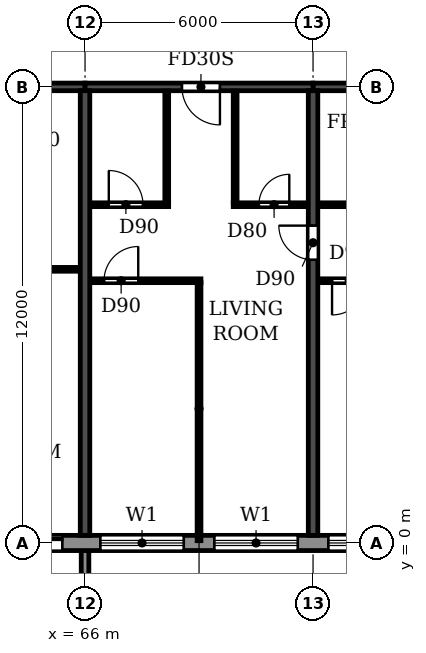
"""IFC4 building model, lengths in metres.
Left out: names, types, materials, properties, quantities, classifications, styles, units other than length and angle.
Written with IfcOpenShell. Run it as: python <this file> out.ifc"""

import sys

from ifc_helpers import new_model, si_unit, direction, frame, frame_2d, origin, place, context, subcontext, project, spatial, polyline, rectangle, outline, extrude, source, transform, mapped, element, fill, save


model = new_model("IFC4")
c1 = context("Model", 3, precision=1e-05, world=origin(), true_north=direction((0.0, 1.0)))
c2 = subcontext(c1, "Body", "Model", "MODEL_VIEW")
j1 = project(units=[si_unit("LENGTHUNIT", "METRE"), si_unit("PLANEANGLEUNIT", "RADIAN")], contexts=[c1])
p1 = place(None, origin())
s1 = spatial("IfcSite", under=j1, at=p1, CompositionType="ELEMENT")
p2 = place(p1, origin())
s2 = spatial("IfcBuilding", under=s1, at=p2, CompositionType="ELEMENT")
p3 = place(p2, frame((0.0, 0.0, 231.3)))
s3 = spatial("IfcBuildingStorey", under=s2, at=p3, CompositionType="ELEMENT", Elevation=231.3)
p4 = place(p3, frame((66.0, 0.2, 0.0), z_axis=(0.0, 0.0, 1.0), x_axis=(0.0, 1.0, 0.0)))
e1 = element("IfcWall", 1, at=p4, inside=s3, PredefinedType="SHEAR", context=c2, shape_type="SweptSolid", body=[
    extrude(rectangle(XDim=11.7, YDim=0.25, at=frame_2d((5.85, 0.0))), origin(), (0.0, 0.0, 1.0), 3.08),
])
p5 = place(p3, frame((72.0, 0.2, 0.0), z_axis=(0.0, 0.0, 1.0), x_axis=(0.0, 1.0, 0.0)))
e2 = element("IfcWall", 2, at=p5, inside=s3, PredefinedType="SHEAR", context=c2, shape_type="SweptSolid", body=[
    extrude(rectangle(XDim=11.7, YDim=0.25, at=frame_2d((5.85, 0.0))), origin(), (0.0, 0.0, 1.0), 3.08),
])
p6 = place(p5, frame((7.25, 0.0, 0.0)))
e3 = element("IfcOpeningElement", 3, at=p6, cuts=e2, PredefinedType="OPENING", context=c2, shape_type="SweptSolid", body=[
    extrude(rectangle(XDim=0.9, YDim=2.1, at=frame_2d((0.45, 1.05))), frame((0.0, 0.135, 0.0), z_axis=(0.0, -1.0, 0.0), x_axis=(1.0, 0.0, 0.0)), (0.0, 0.0, 1.0), 0.27),
])
p7 = place(p3, frame((60.0, 12.0, 0.0), z_axis=(0.0, 0.0, 1.0), x_axis=(1.0, 0.0, 0.0)))
e4 = element("IfcWall", 4, at=p7, inside=s3, PredefinedType="SHEAR", context=c2, shape_type="SweptSolid", body=[
    extrude(rectangle(XDim=6.0, YDim=0.2, at=frame_2d((3.0, 0.0))), origin(), (0.0, 0.0, 1.0), 2.48),
])
p8 = place(p7, frame((2.45, 0.0, 0.0)))
e5 = element("IfcOpeningElement", 5, at=p8, cuts=e4, PredefinedType="OPENING", context=c2, shape_type="SweptSolid", body=[
    extrude(rectangle(XDim=1.0, YDim=2.1, at=frame_2d((0.5, 1.05))), frame((0.0, 0.11, 0.0), z_axis=(0.0, -1.0, 0.0), x_axis=(1.0, 0.0, 0.0)), (0.0, 0.0, 1.0), 0.22),
])
p9 = place(p3, frame((66.0, 12.0, 0.0), z_axis=(0.0, 0.0, 1.0), x_axis=(1.0, 0.0, 0.0)))
e6 = element("IfcWall", 6, at=p9, inside=s3, PredefinedType="SHEAR", context=c2, shape_type="SweptSolid", body=[
    extrude(rectangle(XDim=6.0, YDim=0.2, at=frame_2d((3.0, 0.0))), origin(), (0.0, 0.0, 1.0), 2.48),
])
p10 = place(p9, frame((2.55, 0.0, 0.0)))
e7 = element("IfcOpeningElement", 7, at=p10, cuts=e6, PredefinedType="OPENING", context=c2, shape_type="SweptSolid", body=[
    extrude(rectangle(XDim=1.0, YDim=2.1, at=frame_2d((0.5, 1.05))), frame((0.0, 0.11, 0.0), z_axis=(0.0, -1.0, 0.0), x_axis=(1.0, 0.0, 0.0)), (0.0, 0.0, 1.0), 0.22),
])
p11 = place(p3, frame((72.0, 12.0, 0.0), z_axis=(0.0, 0.0, 1.0), x_axis=(1.0, 0.0, 0.0)))
e8 = element("IfcWall", 8, at=p11, inside=s3, PredefinedType="SHEAR", context=c2, shape_type="SweptSolid", body=[
    extrude(rectangle(XDim=6.0, YDim=0.2, at=frame_2d((3.0, 0.0))), origin(), (0.0, 0.0, 1.0), 2.48),
])
p12 = place(p3, frame((22.683, 0.0, 0.0), z_axis=(0.0, 0.0, 1.0), x_axis=(1.0, 0.0, 0.0)))
e9 = element("IfcWall", 9, at=p12, inside=s3, PredefinedType="STANDARD", context=c2, shape_type="SweptSolid", body=[
    extrude(rectangle(XDim=56.634, YDim=0.4, at=frame_2d((28.317, 0.0))), origin(), (0.0, 0.0, 1.0), 3.08),
])
p13 = place(p12, frame((1.917, 0.0, 0.0)))
e10 = element("IfcOpeningElement", 10, at=p13, cuts=e9, PredefinedType="OPENING", context=c2, shape_type="SweptSolid", body=[
    extrude(rectangle(XDim=1.8, YDim=2.4, at=frame_2d((0.9, 1.2))), frame((0.0, 0.21, 0.0), z_axis=(0.0, -1.0, 0.0), x_axis=(1.0, 0.0, 0.0)), (0.0, 0.0, 1.0), 0.42),
])
p14 = place(p12, frame((4.717, 0.0, 0.9)))
e11 = element("IfcOpeningElement", 11, at=p14, cuts=e9, PredefinedType="OPENING", context=c2, shape_type="SweptSolid", body=[
    extrude(rectangle(XDim=2.2, YDim=1.5, at=frame_2d((1.1, 0.75))), frame((0.0, 0.21, 0.0), z_axis=(0.0, -1.0, 0.0), x_axis=(1.0, 0.0, 0.0)), (0.0, 0.0, 1.0), 0.42),
])
p15 = place(p12, frame((7.717, 0.0, 0.9)))
e12 = element("IfcOpeningElement", 12, at=p15, cuts=e9, PredefinedType="OPENING", context=c2, shape_type="SweptSolid", body=[
    extrude(rectangle(XDim=2.2, YDim=1.5, at=frame_2d((1.1, 0.75))), frame((0.0, 0.21, 0.0), z_axis=(0.0, -1.0, 0.0), x_axis=(1.0, 0.0, 0.0)), (0.0, 0.0, 1.0), 0.42),
])
p16 = place(p12, frame((10.717, 0.0, 0.9)))
e13 = element("IfcOpeningElement", 13, at=p16, cuts=e9, PredefinedType="OPENING", context=c2, shape_type="SweptSolid", body=[
    extrude(rectangle(XDim=2.2, YDim=1.5, at=frame_2d((1.1, 0.75))), frame((0.0, 0.21, 0.0), z_axis=(0.0, -1.0, 0.0), x_axis=(1.0, 0.0, 0.0)), (0.0, 0.0, 1.0), 0.42),
])
p17 = place(p12, frame((13.717, 0.0, 0.9)))
e14 = element("IfcOpeningElement", 14, at=p17, cuts=e9, PredefinedType="OPENING", context=c2, shape_type="SweptSolid", body=[
    extrude(rectangle(XDim=2.2, YDim=1.5, at=frame_2d((1.1, 0.75))), frame((0.0, 0.21, 0.0), z_axis=(0.0, -1.0, 0.0), x_axis=(1.0, 0.0, 0.0)), (0.0, 0.0, 1.0), 0.42),
])
p18 = place(p12, frame((16.917, 0.0, 0.0)))
e15 = element("IfcOpeningElement", 15, at=p18, cuts=e9, PredefinedType="OPENING", context=c2, shape_type="SweptSolid", body=[
    extrude(rectangle(XDim=1.8, YDim=2.4, at=frame_2d((0.9, 1.2))), frame((0.0, 0.21, 0.0), z_axis=(0.0, -1.0, 0.0), x_axis=(1.0, 0.0, 0.0)), (0.0, 0.0, 1.0), 0.42),
])
p19 = place(p12, frame((19.717, 0.0, 0.9)))
e16 = element("IfcOpeningElement", 16, at=p19, cuts=e9, PredefinedType="OPENING", context=c2, shape_type="SweptSolid", body=[
    extrude(rectangle(XDim=2.2, YDim=1.5, at=frame_2d((1.1, 0.75))), frame((0.0, 0.21, 0.0), z_axis=(0.0, -1.0, 0.0), x_axis=(1.0, 0.0, 0.0)), (0.0, 0.0, 1.0), 0.42),
])
p20 = place(p12, frame((22.717, 0.0, 0.9)))
e17 = element("IfcOpeningElement", 17, at=p20, cuts=e9, PredefinedType="OPENING", context=c2, shape_type="SweptSolid", body=[
    extrude(rectangle(XDim=2.2, YDim=1.5, at=frame_2d((1.1, 0.75))), frame((0.0, 0.21, 0.0), z_axis=(0.0, -1.0, 0.0), x_axis=(1.0, 0.0, 0.0)), (0.0, 0.0, 1.0), 0.42),
])
p21 = place(p12, frame((25.917, 0.0, 0.0)))
e18 = element("IfcOpeningElement", 18, at=p21, cuts=e9, PredefinedType="OPENING", context=c2, shape_type="SweptSolid", body=[
    extrude(rectangle(XDim=1.8, YDim=2.4, at=frame_2d((0.9, 1.2))), frame((0.0, 0.21, 0.0), z_axis=(0.0, -1.0, 0.0), x_axis=(1.0, 0.0, 0.0)), (0.0, 0.0, 1.0), 0.42),
])
p22 = place(p12, frame((28.717, 0.0, 0.9)))
e19 = element("IfcOpeningElement", 19, at=p22, cuts=e9, PredefinedType="OPENING", context=c2, shape_type="SweptSolid", body=[
    extrude(rectangle(XDim=2.2, YDim=1.5, at=frame_2d((1.1, 0.75))), frame((0.0, 0.21, 0.0), z_axis=(0.0, -1.0, 0.0), x_axis=(1.0, 0.0, 0.0)), (0.0, 0.0, 1.0), 0.42),
])
p23 = place(p12, frame((31.717, 0.0, 0.9)))
e20 = element("IfcOpeningElement", 20, at=p23, cuts=e9, PredefinedType="OPENING", context=c2, shape_type="SweptSolid", body=[
    extrude(rectangle(XDim=2.2, YDim=1.5, at=frame_2d((1.1, 0.75))), frame((0.0, 0.21, 0.0), z_axis=(0.0, -1.0, 0.0), x_axis=(1.0, 0.0, 0.0)), (0.0, 0.0, 1.0), 0.42),
])
p24 = place(p12, frame((34.717, 0.0, 0.9)))
e21 = element("IfcOpeningElement", 21, at=p24, cuts=e9, PredefinedType="OPENING", context=c2, shape_type="SweptSolid", body=[
    extrude(rectangle(XDim=2.2, YDim=1.5, at=frame_2d((1.1, 0.75))), frame((0.0, 0.21, 0.0), z_axis=(0.0, -1.0, 0.0), x_axis=(1.0, 0.0, 0.0)), (0.0, 0.0, 1.0), 0.42),
])
p25 = place(p12, frame((37.717, 0.0, 0.9)))
e22 = element("IfcOpeningElement", 22, at=p25, cuts=e9, PredefinedType="OPENING", context=c2, shape_type="SweptSolid", body=[
    extrude(rectangle(XDim=2.2, YDim=1.5, at=frame_2d((1.1, 0.75))), frame((0.0, 0.21, 0.0), z_axis=(0.0, -1.0, 0.0), x_axis=(1.0, 0.0, 0.0)), (0.0, 0.0, 1.0), 0.42),
])
p26 = place(p12, frame((40.917, 0.0, 0.0)))
e23 = element("IfcOpeningElement", 23, at=p26, cuts=e9, PredefinedType="OPENING", context=c2, shape_type="SweptSolid", body=[
    extrude(rectangle(XDim=1.8, YDim=2.4, at=frame_2d((0.9, 1.2))), frame((0.0, 0.21, 0.0), z_axis=(0.0, -1.0, 0.0), x_axis=(1.0, 0.0, 0.0)), (0.0, 0.0, 1.0), 0.42),
])
p27 = place(p12, frame((43.717, 0.0, 0.9)))
e24 = element("IfcOpeningElement", 24, at=p27, cuts=e9, PredefinedType="OPENING", context=c2, shape_type="SweptSolid", body=[
    extrude(rectangle(XDim=2.2, YDim=1.5, at=frame_2d((1.1, 0.75))), frame((0.0, 0.21, 0.0), z_axis=(0.0, -1.0, 0.0), x_axis=(1.0, 0.0, 0.0)), (0.0, 0.0, 1.0), 0.42),
])
p28 = place(p12, frame((46.717, 0.0, 0.9)))
e25 = element("IfcOpeningElement", 25, at=p28, cuts=e9, PredefinedType="OPENING", context=c2, shape_type="SweptSolid", body=[
    extrude(rectangle(XDim=2.2, YDim=1.5, at=frame_2d((1.1, 0.75))), frame((0.0, 0.21, 0.0), z_axis=(0.0, -1.0, 0.0), x_axis=(1.0, 0.0, 0.0)), (0.0, 0.0, 1.0), 0.42),
])
p29 = place(p12, frame((49.717, 0.0, 0.9)))
e26 = element("IfcOpeningElement", 26, at=p29, cuts=e9, PredefinedType="OPENING", context=c2, shape_type="SweptSolid", body=[
    extrude(rectangle(XDim=2.2, YDim=1.5, at=frame_2d((1.1, 0.75))), frame((0.0, 0.21, 0.0), z_axis=(0.0, -1.0, 0.0), x_axis=(1.0, 0.0, 0.0)), (0.0, 0.0, 1.0), 0.42),
])
p30 = place(p12, frame((52.717, 0.0, 0.9)))
e27 = element("IfcOpeningElement", 27, at=p30, cuts=e9, PredefinedType="OPENING", context=c2, shape_type="SweptSolid", body=[
    extrude(rectangle(XDim=2.2, YDim=1.5, at=frame_2d((1.1, 0.75))), frame((0.0, 0.21, 0.0), z_axis=(0.0, -1.0, 0.0), x_axis=(1.0, 0.0, 0.0)), (0.0, 0.0, 1.0), 0.42),
])
m1 = source(origin(), c2, "Body", "SweptSolid", [
    extrude(outline(polyline([(0.0, 0.0), (0.2, 0.0), (0.2, 1.65), (0.0, 1.65), (0.0, 0.0)])), origin(), (0.0, 0.0, 1.0), 3.1),
])
p31 = place(p3, frame((65.9, -1.85, 0.0)))
e28 = element("IfcWall", 28, at=p31, inside=s3, PredefinedType="STANDARD", context=c2, shape_type="MappedRepresentation", body=[
    mapped(m1, transform((0.0, 0.0, 0.0))),
])
p32 = place(p3, frame((66.135, 6.9, 0.0), z_axis=(0.0, 0.0, 1.0), x_axis=(1.0, 0.0, 0.0)))
e29 = element("IfcWall", 29, at=p32, inside=s3, PredefinedType="PARTITIONING", context=c2, shape_type="SweptSolid", body=[
    extrude(rectangle(XDim=2.915, YDim=0.1, at=frame_2d((1.458, 0.0))), origin(), (0.0, 0.0, 1.0), 3.08),
])
p33 = place(p32, frame((0.365, 0.0, 0.0)))
e30 = element("IfcOpeningElement", 30, at=p33, cuts=e29, PredefinedType="OPENING", context=c2, shape_type="SweptSolid", body=[
    extrude(rectangle(XDim=0.9, YDim=2.1, at=frame_2d((0.45, 1.05))), frame((0.0, 0.06, 0.0), z_axis=(0.0, -1.0, 0.0), x_axis=(1.0, 0.0, 0.0)), (0.0, 0.0, 1.0), 0.12),
])
p34 = place(p3, frame((72.135, 6.9, 0.0), z_axis=(0.0, 0.0, 1.0), x_axis=(1.0, 0.0, 0.0)))
e31 = element("IfcWall", 31, at=p34, inside=s3, PredefinedType="PARTITIONING", context=c2, shape_type="SweptSolid", body=[
    extrude(rectangle(XDim=5.73, YDim=0.1, at=frame_2d((2.865, 0.0))), origin(), (0.0, 0.0, 1.0), 3.08),
])
p35 = place(p34, frame((0.365, 0.0, 0.0)))
e32 = element("IfcOpeningElement", 32, at=p35, cuts=e31, PredefinedType="OPENING", context=c2, shape_type="SweptSolid", body=[
    extrude(rectangle(XDim=0.9, YDim=2.1, at=frame_2d((0.45, 1.05))), frame((0.0, 0.06, 0.0), z_axis=(0.0, -1.0, 0.0), x_axis=(1.0, 0.0, 0.0)), (0.0, 0.0, 1.0), 0.12),
])
p36 = place(p34, frame((4.465, 0.0, 0.0)))
e33 = element("IfcOpeningElement", 33, at=p36, cuts=e31, PredefinedType="OPENING", context=c2, shape_type="SweptSolid", body=[
    extrude(rectangle(XDim=0.9, YDim=2.1, at=frame_2d((0.45, 1.05))), frame((0.0, 0.06, 0.0), z_axis=(0.0, -1.0, 0.0), x_axis=(1.0, 0.0, 0.0)), (0.0, 0.0, 1.0), 0.12),
])
p37 = place(p3, frame((63.8, 7.2, 0.0), z_axis=(0.0, 0.0, 1.0), x_axis=(1.0, 0.0, 0.0)))
e34 = element("IfcWall", 34, at=p37, inside=s3, PredefinedType="PARTITIONING", context=c2, shape_type="SweptSolid", body=[
    extrude(rectangle(XDim=2.065, YDim=0.1, at=frame_2d((1.032, 0.0))), origin(), (0.0, 0.0, 1.0), 3.08),
])
p38 = place(p3, frame((66.135, 8.9, 0.0), z_axis=(0.0, 0.0, 1.0), x_axis=(1.0, 0.0, 0.0)))
e35 = element("IfcWall", 35, at=p38, inside=s3, PredefinedType="PARTITIONING", context=c2, shape_type="SweptSolid", body=[
    extrude(rectangle(XDim=2.065, YDim=0.1, at=frame_2d((1.032, 0.0))), origin(), (0.0, 0.0, 1.0), 3.08),
])
p39 = place(p38, frame((0.49, 0.0, 0.0)))
e36 = element("IfcOpeningElement", 36, at=p39, cuts=e35, PredefinedType="OPENING", context=c2, shape_type="SweptSolid", body=[
    extrude(rectangle(XDim=0.9, YDim=2.1, at=frame_2d((0.45, 1.05))), frame((0.0, 0.06, 0.0), z_axis=(0.0, -1.0, 0.0), x_axis=(1.0, 0.0, 0.0)), (0.0, 0.0, 1.0), 0.12),
])
p40 = place(p3, frame((69.9, 8.9, 0.0), z_axis=(0.0, 0.0, 1.0), x_axis=(1.0, 0.0, 0.0)))
e37 = element("IfcWall", 37, at=p40, inside=s3, PredefinedType="PARTITIONING", context=c2, shape_type="SweptSolid", body=[
    extrude(rectangle(XDim=1.965, YDim=0.1, at=frame_2d((0.982, 0.0))), origin(), (0.0, 0.0, 1.0), 3.08),
])
p41 = place(p40, frame((0.675, 0.0, 0.0)))
e38 = element("IfcOpeningElement", 38, at=p41, cuts=e37, PredefinedType="OPENING", context=c2, shape_type="SweptSolid", body=[
    extrude(rectangle(XDim=0.8, YDim=2.1, at=frame_2d((0.4, 1.05))), frame((0.0, 0.06, 0.0), z_axis=(0.0, -1.0, 0.0), x_axis=(1.0, 0.0, 0.0)), (0.0, 0.0, 1.0), 0.12),
])
p42 = place(p3, frame((72.135, 8.9, 0.0), z_axis=(0.0, 0.0, 1.0), x_axis=(1.0, 0.0, 0.0)))
e39 = element("IfcWall", 39, at=p42, inside=s3, PredefinedType="PARTITIONING", context=c2, shape_type="SweptSolid", body=[
    extrude(rectangle(XDim=3.215, YDim=0.1, at=frame_2d((1.607, 0.0))), origin(), (0.0, 0.0, 1.0), 3.08),
])
p43 = place(p42, frame((1.115, 0.0, 0.0)))
e40 = element("IfcOpeningElement", 40, at=p43, cuts=e39, PredefinedType="OPENING", context=c2, shape_type="SweptSolid", body=[
    extrude(rectangle(XDim=0.8, YDim=2.1, at=frame_2d((0.4, 1.05))), frame((0.0, 0.06, 0.0), z_axis=(0.0, -1.0, 0.0), x_axis=(1.0, 0.0, 0.0)), (0.0, 0.0, 1.0), 0.12),
])
p44 = place(p3, frame((68.15, 8.95, 0.0), z_axis=(0.0, 0.0, 1.0), x_axis=(0.0, 1.0, 0.0)))
e41 = element("IfcWall", 41, at=p44, inside=s3, PredefinedType="PARTITIONING", context=c2, shape_type="SweptSolid", body=[
    extrude(rectangle(XDim=2.94, YDim=0.1, at=frame_2d((1.47, 0.0))), origin(), (0.0, 0.0, 1.0), 3.08),
])
p45 = place(p3, frame((69.0, 0.06, 0.0), z_axis=(0.0, 0.0, 1.0), x_axis=(0.0, 1.0, 0.0)))
e42 = element("IfcWall", 42, at=p45, inside=s3, PredefinedType="PARTITIONING", context=c2, shape_type="SweptSolid", body=[
    extrude(rectangle(XDim=6.79, YDim=0.1, at=frame_2d((3.395, 0.0))), origin(), (0.0, 0.0, 1.0), 3.08),
])
p46 = place(p3, frame((69.95, 8.95, 0.0), z_axis=(0.0, 0.0, 1.0), x_axis=(0.0, 1.0, 0.0)))
e43 = element("IfcWall", 43, at=p46, inside=s3, PredefinedType="PARTITIONING", context=c2, shape_type="SweptSolid", body=[
    extrude(rectangle(XDim=2.94, YDim=0.1, at=frame_2d((1.47, 0.0))), origin(), (0.0, 0.0, 1.0), 3.08),
])
p47 = place(p26, origin())
e44 = element("IfcDoor", 44, at=p47, inside=s3, OperationType="DOUBLE_DOOR_SLIDING", PredefinedType="DOOR", context=c2, shape_type="SweptSolid", body=[
    extrude(rectangle(XDim=1.8, YDim=2.4, at=frame_2d((0.9, 1.2))), frame((0.0, 0.025, 0.0), z_axis=(0.0, -1.0, 0.0), x_axis=(1.0, 0.0, 0.0)), (0.0, 0.0, 1.0), 0.05),
])
fill(e23, e44)
p48 = place(p27, origin())
e45 = element("IfcWindow", 45, at=p48, inside=s3, PartitioningType="DOUBLE_PANEL_HORIZONTAL", PredefinedType="WINDOW", context=c2, shape_type="SweptSolid", body=[
    extrude(rectangle(XDim=2.2, YDim=1.5, at=frame_2d((1.1, 0.75))), frame((0.0, 0.03, 0.0), z_axis=(0.0, -1.0, 0.0), x_axis=(1.0, 0.0, 0.0)), (0.0, 0.0, 1.0), 0.06),
])
fill(e24, e45)
p49 = place(p28, origin())
e46 = element("IfcWindow", 46, at=p49, inside=s3, PartitioningType="DOUBLE_PANEL_HORIZONTAL", PredefinedType="WINDOW", context=c2, shape_type="SweptSolid", body=[
    extrude(rectangle(XDim=2.2, YDim=1.5, at=frame_2d((1.1, 0.75))), frame((0.0, 0.03, 0.0), z_axis=(0.0, -1.0, 0.0), x_axis=(1.0, 0.0, 0.0)), (0.0, 0.0, 1.0), 0.06),
])
fill(e25, e46)
p50 = place(p29, origin())
e47 = element("IfcWindow", 47, at=p50, inside=s3, PartitioningType="DOUBLE_PANEL_HORIZONTAL", PredefinedType="WINDOW", context=c2, shape_type="SweptSolid", body=[
    extrude(rectangle(XDim=2.2, YDim=1.5, at=frame_2d((1.1, 0.75))), frame((0.0, 0.03, 0.0), z_axis=(0.0, -1.0, 0.0), x_axis=(1.0, 0.0, 0.0)), (0.0, 0.0, 1.0), 0.06),
])
fill(e26, e47)
p51 = place(p35, frame((0.9, 0.0, 0.0), z_axis=(0.0, 0.0, 1.0), x_axis=(-1.0, 0.0, 0.0)))
e48 = element("IfcDoor", 48, at=p51, inside=s3, OperationType="SINGLE_SWING_RIGHT", PredefinedType="DOOR", context=c2, shape_type="SweptSolid", body=[
    extrude(rectangle(XDim=0.9, YDim=2.1, at=frame_2d((0.45, 1.05))), frame((0.0, 0.025, 0.0), z_axis=(0.0, -1.0, 0.0), x_axis=(1.0, 0.0, 0.0)), (0.0, 0.0, 1.0), 0.05),
])
fill(e32, e48)
p52 = place(p33, origin())
e49 = element("IfcDoor", 49, at=p52, inside=s3, OperationType="SINGLE_SWING_RIGHT", PredefinedType="DOOR", context=c2, shape_type="SweptSolid", body=[
    extrude(rectangle(XDim=0.9, YDim=2.1, at=frame_2d((0.45, 1.05))), frame((0.0, 0.025, 0.0), z_axis=(0.0, -1.0, 0.0), x_axis=(1.0, 0.0, 0.0)), (0.0, 0.0, 1.0), 0.05),
])
fill(e30, e49)
p53 = place(p39, origin())
e50 = element("IfcDoor", 50, at=p53, inside=s3, OperationType="SINGLE_SWING_LEFT", PredefinedType="DOOR", context=c2, shape_type="SweptSolid", body=[
    extrude(rectangle(XDim=0.9, YDim=2.1, at=frame_2d((0.45, 1.05))), frame((0.0, 0.025, 0.0), z_axis=(0.0, -1.0, 0.0), x_axis=(1.0, 0.0, 0.0)), (0.0, 0.0, 1.0), 0.05),
])
fill(e36, e50)
p54 = place(p10, frame((1.0, 0.0, 0.0), z_axis=(0.0, 0.0, 1.0), x_axis=(-1.0, 0.0, 0.0)))
e51 = element("IfcDoor", 51, at=p54, inside=s3, OperationType="SINGLE_SWING_LEFT", PredefinedType="DOOR", context=c2, shape_type="SweptSolid", body=[
    extrude(rectangle(XDim=1.0, YDim=2.1, at=frame_2d((0.5, 1.05))), frame((0.0, 0.025, 0.0), z_axis=(0.0, -1.0, 0.0), x_axis=(1.0, 0.0, 0.0)), (0.0, 0.0, 1.0), 0.05),
])
fill(e7, e51)
p55 = place(p41, origin())
e52 = element("IfcDoor", 52, at=p55, inside=s3, OperationType="SINGLE_SWING_RIGHT", PredefinedType="DOOR", context=c2, shape_type="SweptSolid", body=[
    extrude(rectangle(XDim=0.8, YDim=2.1, at=frame_2d((0.4, 1.05))), frame((0.0, 0.025, 0.0), z_axis=(0.0, -1.0, 0.0), x_axis=(1.0, 0.0, 0.0)), (0.0, 0.0, 1.0), 0.05),
])
fill(e38, e52)
p56 = place(p6, origin())
e53 = element("IfcDoor", 53, at=p56, inside=s3, OperationType="SINGLE_SWING_RIGHT", PredefinedType="DOOR", context=c2, shape_type="SweptSolid", body=[
    extrude(rectangle(XDim=0.9, YDim=2.1, at=frame_2d((0.45, 1.05))), frame((0.0, 0.025, 0.0), z_axis=(0.0, -1.0, 0.0), x_axis=(1.0, 0.0, 0.0)), (0.0, 0.0, 1.0), 0.05),
])
fill(e3, e53)
save(model, sys.argv[1])
